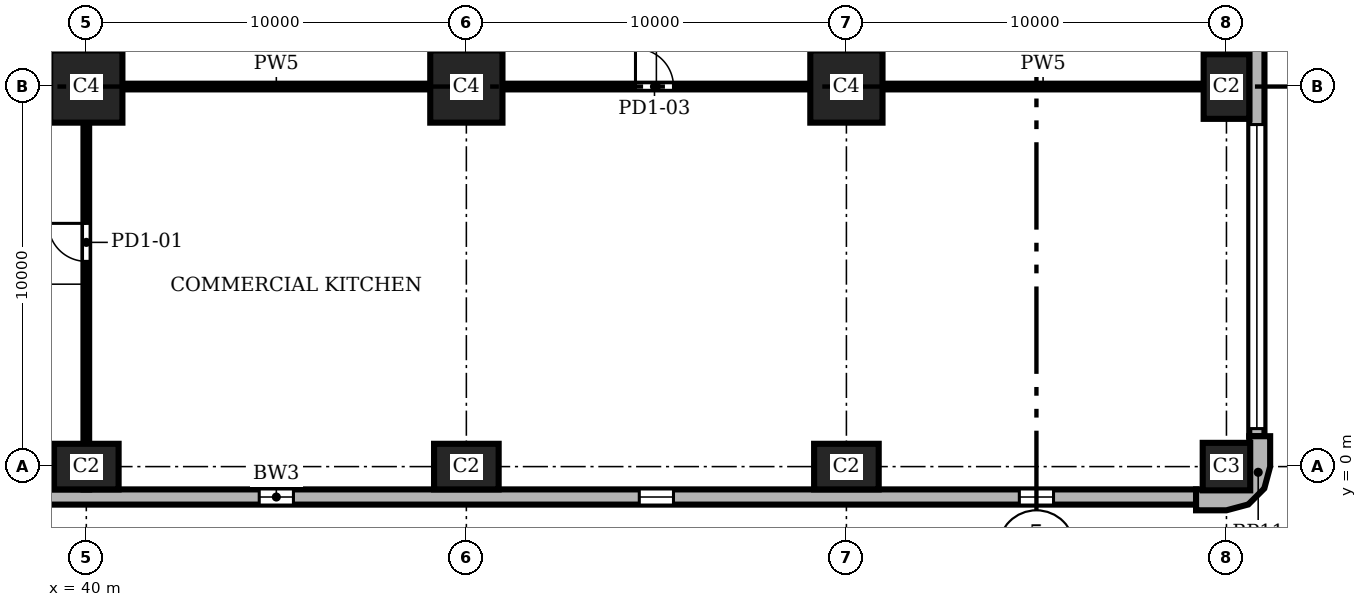
"""IFC4 building model, lengths in metres.
Left out: names, types, materials, properties, quantities, classifications, styles, units other than length and angle.
Written with IfcOpenShell. Run it as: python <this file> out.ifc"""

import sys

from ifc_helpers import new_model, si_unit, direction, frame, frame_2d, origin, origin_2d, place, context, subcontext, project, spatial, polyline, rectangle, outline, extrude, element, fill, save


model = new_model("IFC4")
c1 = context("Model", 3, precision=1e-05, world=origin(), true_north=direction((0.0, 1.0)))
c2 = subcontext(c1, "Body", "Model", "MODEL_VIEW")
j1 = project(units=[si_unit("LENGTHUNIT", "METRE"), si_unit("PLANEANGLEUNIT", "RADIAN")], contexts=[c1])
p1 = place(None, origin())
s1 = spatial("IfcSite", under=j1, at=p1, CompositionType="ELEMENT")
p2 = place(p1, origin())
s2 = spatial("IfcBuilding", under=s1, at=p2, CompositionType="ELEMENT")
p3 = place(p2, frame((0.0, 0.0, 6.0)))
s3 = spatial("IfcBuildingStorey", under=s2, at=p3, CompositionType="ELEMENT", Elevation=6.0)
for number, where, z_axis, x_axis in (
    (1, (40.0, 0.0, 0.0), (0.0, 0.0, 1.0), (1.0, 0.0, 0.0)),
    (2, (50.0, 0.0, 0.0), (0.0, 0.0, 1.0), (1.0, 0.0, 0.0)),
    (3, (60.0, 0.0, 0.0), (0.0, 0.0, 1.0), (1.0, 0.0, 0.0)),
):
    element("IfcColumn", number, at=place(p3, frame(where, z_axis=z_axis, x_axis=x_axis)), inside=s3, PredefinedType="COLUMN", context=c2, shape_type="SweptSolid", body=[
        extrude(rectangle(XDim=1.7, YDim=1.2, at=origin_2d()), origin(), (0.0, 0.0, 1.0), 6.0),
    ])
p4 = place(p3, frame((70.0, 0.0, 0.0), z_axis=(0.0, 0.0, 1.0), x_axis=(1.0, 0.0, 0.0)))
e4 = element("IfcColumn", 4, at=p4, inside=s3, PredefinedType="COLUMN", context=c2, shape_type="SweptSolid", body=[
    extrude(rectangle(XDim=1.25, YDim=1.25, at=origin_2d()), origin(), (0.0, 0.0, 1.0), 6.0),
])
p5 = place(p3, frame((70.0, 10.0, 0.0), z_axis=(0.0, 0.0, 1.0), x_axis=(0.0, 1.0, 0.0)))
e5 = element("IfcColumn", 5, at=p5, inside=s3, PredefinedType="COLUMN", context=c2, shape_type="SweptSolid", body=[
    extrude(rectangle(XDim=1.7, YDim=1.2, at=origin_2d()), origin(), (0.0, 0.0, 1.0), 6.0),
])
for number, where, z_axis, x_axis in (
    (6, (40.0, 10.0, 0.0), (0.0, 0.0, 1.0), (1.0, 0.0, 0.0)),
    (7, (50.0, 10.0, 0.0), (0.0, 0.0, 1.0), (1.0, 0.0, 0.0)),
    (8, (60.0, 10.0, 0.0), (0.0, 0.0, 1.0), (1.0, 0.0, 0.0)),
):
    element("IfcColumn", number, at=place(p3, frame(where, z_axis=z_axis, x_axis=x_axis)), inside=s3, PredefinedType="COLUMN", context=c2, shape_type="SweptSolid", body=[
        extrude(rectangle(XDim=1.9, YDim=1.9, at=origin_2d()), origin(), (0.0, 0.0, 1.0), 6.0),
    ])
p6 = place(p3, origin())
e9 = element("IfcWall", 9, at=p6, inside=s3, PredefinedType="SOLIDWALL", context=c2, shape_type="SweptSolid", body=[
    extrude(outline(polyline([(69.2, -1.0), (69.2, -1.15), (70.0, -1.15), (70.575, -0.996), (70.996, -0.575), (71.15, 0.0), (71.15, 0.8), (71.0, 0.8), (70.6, 0.8), (70.6, 0.0), (70.52, -0.3), (70.3, -0.52), (70.0, -0.6), (69.2, -0.6), (69.2, -1.0)])), origin(), (0.0, 0.0, 1.0), 6.0),
])
p7 = place(p3, frame((20.8, -0.8, 0.0), z_axis=(0.0, 0.0, 1.0), x_axis=(1.0, 0.0, 0.0)))
e10 = element("IfcWall", 10, at=p7, inside=s3, PredefinedType="SOLIDWALL", context=c2, shape_type="SweptSolid", body=[
    extrude(rectangle(XDim=48.4, YDim=0.4, at=frame_2d((24.2, 0.0))), origin(), (0.0, 0.0, 1.0), 6.0),
])
p8 = place(p7, frame((3.75, 0.0, 1.0)))
e11 = element("IfcOpeningElement", 11, at=p8, cuts=e10, PredefinedType="OPENING", context=c2, shape_type="SweptSolid", body=[
    extrude(rectangle(XDim=0.9, YDim=4.2, at=frame_2d((0.45, 2.1))), frame((0.0, 0.21, 0.0), z_axis=(0.0, -1.0, 0.0), x_axis=(1.0, 0.0, 0.0)), (0.0, 0.0, 1.0), 0.42),
])
p9 = place(p7, frame((13.75, 0.0, 1.0)))
e12 = element("IfcOpeningElement", 12, at=p9, cuts=e10, PredefinedType="OPENING", context=c2, shape_type="SweptSolid", body=[
    extrude(rectangle(XDim=0.9, YDim=4.2, at=frame_2d((0.45, 2.1))), frame((0.0, 0.21, 0.0), z_axis=(0.0, -1.0, 0.0), x_axis=(1.0, 0.0, 0.0)), (0.0, 0.0, 1.0), 0.42),
])
p10 = place(p7, frame((23.75, 0.0, 1.0)))
e13 = element("IfcOpeningElement", 13, at=p10, cuts=e10, PredefinedType="OPENING", context=c2, shape_type="SweptSolid", body=[
    extrude(rectangle(XDim=0.9, YDim=4.2, at=frame_2d((0.45, 2.1))), frame((0.0, 0.21, 0.0), z_axis=(0.0, -1.0, 0.0), x_axis=(1.0, 0.0, 0.0)), (0.0, 0.0, 1.0), 0.42),
])
p11 = place(p7, frame((33.75, 0.0, 1.0)))
e14 = element("IfcOpeningElement", 14, at=p11, cuts=e10, PredefinedType="OPENING", context=c2, shape_type="SweptSolid", body=[
    extrude(rectangle(XDim=0.9, YDim=4.2, at=frame_2d((0.45, 2.1))), frame((0.0, 0.21, 0.0), z_axis=(0.0, -1.0, 0.0), x_axis=(1.0, 0.0, 0.0)), (0.0, 0.0, 1.0), 0.42),
])
p12 = place(p7, frame((43.75, 0.0, 1.0)))
e15 = element("IfcOpeningElement", 15, at=p12, cuts=e10, PredefinedType="OPENING", context=c2, shape_type="SweptSolid", body=[
    extrude(rectangle(XDim=0.9, YDim=4.2, at=frame_2d((0.45, 2.1))), frame((0.0, 0.21, 0.0), z_axis=(0.0, -1.0, 0.0), x_axis=(1.0, 0.0, 0.0)), (0.0, 0.0, 1.0), 0.42),
])
p13 = place(p3, frame((70.8, 0.8, 0.0), z_axis=(0.0, 0.0, 1.0), x_axis=(0.0, 1.0, 0.0)))
e16 = element("IfcWall", 16, at=p13, inside=s3, PredefinedType="SOLIDWALL", context=c2, shape_type="SweptSolid", body=[
    extrude(rectangle(XDim=28.4, YDim=0.4, at=frame_2d((14.2, 0.0))), origin(), (0.0, 0.0, 1.0), 6.0),
])
p14 = place(p13, frame((0.2, 0.0, 0.9)))
e17 = element("IfcOpeningElement", 17, at=p14, cuts=e16, PredefinedType="OPENING", context=c2, shape_type="SweptSolid", body=[
    extrude(rectangle(XDim=8.0, YDim=4.4, at=frame_2d((4.0, 2.2))), frame((0.0, 0.21, 0.0), z_axis=(0.0, -1.0, 0.0), x_axis=(1.0, 0.0, 0.0)), (0.0, 0.0, 1.0), 0.42),
])
p15 = place(p13, frame((10.2, 0.0, 0.9)))
e18 = element("IfcOpeningElement", 18, at=p15, cuts=e16, PredefinedType="OPENING", context=c2, shape_type="SweptSolid", body=[
    extrude(rectangle(XDim=8.0, YDim=4.4, at=frame_2d((4.0, 2.2))), frame((0.0, 0.21, 0.0), z_axis=(0.0, -1.0, 0.0), x_axis=(1.0, 0.0, 0.0)), (0.0, 0.0, 1.0), 0.42),
])
p16 = place(p13, frame((20.2, 0.0, 0.9)))
e19 = element("IfcOpeningElement", 19, at=p16, cuts=e16, PredefinedType="OPENING", context=c2, shape_type="SweptSolid", body=[
    extrude(rectangle(XDim=8.0, YDim=4.4, at=frame_2d((4.0, 2.2))), frame((0.0, 0.21, 0.0), z_axis=(0.0, -1.0, 0.0), x_axis=(1.0, 0.0, 0.0)), (0.0, 0.0, 1.0), 0.42),
])
p17 = place(p3, frame((40.0, -0.6, 0.0), z_axis=(0.0, 0.0, 1.0), x_axis=(0.0, 1.0, 0.0)))
e20 = element("IfcWall", 20, at=p17, inside=s3, PredefinedType="PARTITIONING", context=c2, shape_type="SweptSolid", body=[
    extrude(rectangle(XDim=31.2, YDim=0.15, at=frame_2d((15.6, 0.0))), origin(), (0.0, 0.0, 1.0), 5.68),
])
p18 = place(p17, frame((14.7, 0.0, 0.0)))
e21 = element("IfcOpeningElement", 21, at=p18, cuts=e20, PredefinedType="OPENING", context=c2, shape_type="SweptSolid", body=[
    extrude(rectangle(XDim=1.8, YDim=2.1, at=frame_2d((0.9, 1.05))), frame((0.0, 0.085, 0.0), z_axis=(0.0, -1.0, 0.0), x_axis=(1.0, 0.0, 0.0)), (0.0, 0.0, 1.0), 0.17),
])
p19 = place(p17, frame((6.0, 0.0, 0.0)))
e22 = element("IfcOpeningElement", 22, at=p19, cuts=e20, PredefinedType="OPENING", context=c2, shape_type="SweptSolid", body=[
    extrude(rectangle(XDim=1.0, YDim=2.1, at=frame_2d((0.5, 1.05))), frame((0.0, 0.085, 0.0), z_axis=(0.0, -1.0, 0.0), x_axis=(1.0, 0.0, 0.0)), (0.0, 0.0, 1.0), 0.17),
])
p20 = place(p17, frame((23.6, 0.0, 0.0)))
e23 = element("IfcOpeningElement", 23, at=p20, cuts=e20, PredefinedType="OPENING", context=c2, shape_type="SweptSolid", body=[
    extrude(rectangle(XDim=1.0, YDim=2.1, at=frame_2d((0.5, 1.05))), frame((0.0, 0.085, 0.0), z_axis=(0.0, -1.0, 0.0), x_axis=(1.0, 0.0, 0.0)), (0.0, 0.0, 1.0), 0.17),
])
p21 = place(p3, frame((40.95, 10.0, 0.0), z_axis=(0.0, 0.0, 1.0), x_axis=(1.0, 0.0, 0.0)))
e24 = element("IfcWall", 24, at=p21, inside=s3, PredefinedType="PARTITIONING", context=c2, shape_type="SweptSolid", body=[
    extrude(rectangle(XDim=8.1, YDim=0.15, at=frame_2d((4.05, 0.0))), origin(), (0.0, 0.0, 1.0), 5.68),
])
p22 = place(p3, frame((50.95, 10.0, 0.0), z_axis=(0.0, 0.0, 1.0), x_axis=(1.0, 0.0, 0.0)))
e25 = element("IfcWall", 25, at=p22, inside=s3, PredefinedType="PARTITIONING", context=c2, shape_type="SweptSolid", body=[
    extrude(rectangle(XDim=8.1, YDim=0.15, at=frame_2d((4.05, 0.0))), origin(), (0.0, 0.0, 1.0), 5.68),
])
p23 = place(p22, frame((3.5, 0.0, 0.0)))
e26 = element("IfcOpeningElement", 26, at=p23, cuts=e25, PredefinedType="OPENING", context=c2, shape_type="SweptSolid", body=[
    extrude(rectangle(XDim=1.0, YDim=2.1, at=frame_2d((0.5, 1.05))), frame((0.0, 0.085, 0.0), z_axis=(0.0, -1.0, 0.0), x_axis=(1.0, 0.0, 0.0)), (0.0, 0.0, 1.0), 0.17),
])
p24 = place(p3, frame((60.95, 10.0, 0.0), z_axis=(0.0, 0.0, 1.0), x_axis=(1.0, 0.0, 0.0)))
e27 = element("IfcWall", 27, at=p24, inside=s3, PredefinedType="PARTITIONING", context=c2, shape_type="SweptSolid", body=[
    extrude(rectangle(XDim=8.45, YDim=0.15, at=frame_2d((4.225, 0.0))), origin(), (0.0, 0.0, 1.0), 5.68),
])
p25 = place(p10, origin())
e28 = element("IfcWindow", 28, at=p25, inside=s3, PartitioningType="SINGLE_PANEL", PredefinedType="WINDOW", context=c2, shape_type="SweptSolid", body=[
    extrude(rectangle(XDim=0.9, YDim=4.2, at=frame_2d((0.45, 2.1))), frame((0.0, 0.16, 0.0), z_axis=(0.0, -1.0, 0.0), x_axis=(1.0, 0.0, 0.0)), (0.0, 0.0, 1.0), 0.06),
])
fill(e13, e28)
p26 = place(p11, origin())
e29 = element("IfcWindow", 29, at=p26, inside=s3, PartitioningType="SINGLE_PANEL", PredefinedType="WINDOW", context=c2, shape_type="SweptSolid", body=[
    extrude(rectangle(XDim=0.9, YDim=4.2, at=frame_2d((0.45, 2.1))), frame((0.0, 0.16, 0.0), z_axis=(0.0, -1.0, 0.0), x_axis=(1.0, 0.0, 0.0)), (0.0, 0.0, 1.0), 0.06),
])
fill(e14, e29)
p27 = place(p12, origin())
e30 = element("IfcWindow", 30, at=p27, inside=s3, PartitioningType="SINGLE_PANEL", PredefinedType="WINDOW", context=c2, shape_type="SweptSolid", body=[
    extrude(rectangle(XDim=0.9, YDim=4.2, at=frame_2d((0.45, 2.1))), frame((0.0, 0.16, 0.0), z_axis=(0.0, -1.0, 0.0), x_axis=(1.0, 0.0, 0.0)), (0.0, 0.0, 1.0), 0.06),
])
fill(e15, e30)
p28 = place(p14, origin())
e31 = element("IfcWindow", 31, at=p28, inside=s3, PartitioningType="SINGLE_PANEL", PredefinedType="WINDOW", context=c2, shape_type="SweptSolid", body=[
    extrude(rectangle(XDim=8.0, YDim=4.4, at=frame_2d((4.0, 2.2))), frame((0.0, 0.16, 0.0), z_axis=(0.0, -1.0, 0.0), x_axis=(1.0, 0.0, 0.0)), (0.0, 0.0, 1.0), 0.06),
])
fill(e17, e31)
p29 = place(p19, origin())
e32 = element("IfcDoor", 32, at=p29, inside=s3, OperationType="SINGLE_SWING_RIGHT", PredefinedType="DOOR", context=c2, shape_type="SweptSolid", body=[
    extrude(rectangle(XDim=1.0, YDim=2.1, at=frame_2d((0.5, 1.05))), frame((0.0, 0.025, 0.0), z_axis=(0.0, -1.0, 0.0), x_axis=(1.0, 0.0, 0.0)), (0.0, 0.0, 1.0), 0.05),
])
fill(e22, e32)
p30 = place(p23, origin())
e33 = element("IfcDoor", 33, at=p30, inside=s3, OperationType="SINGLE_SWING_LEFT", PredefinedType="DOOR", context=c2, shape_type="SweptSolid", body=[
    extrude(rectangle(XDim=1.0, YDim=2.1, at=frame_2d((0.5, 1.05))), frame((0.0, 0.025, 0.0), z_axis=(0.0, -1.0, 0.0), x_axis=(1.0, 0.0, 0.0)), (0.0, 0.0, 1.0), 0.05),
])
fill(e26, e33)
save(model, sys.argv[1])
